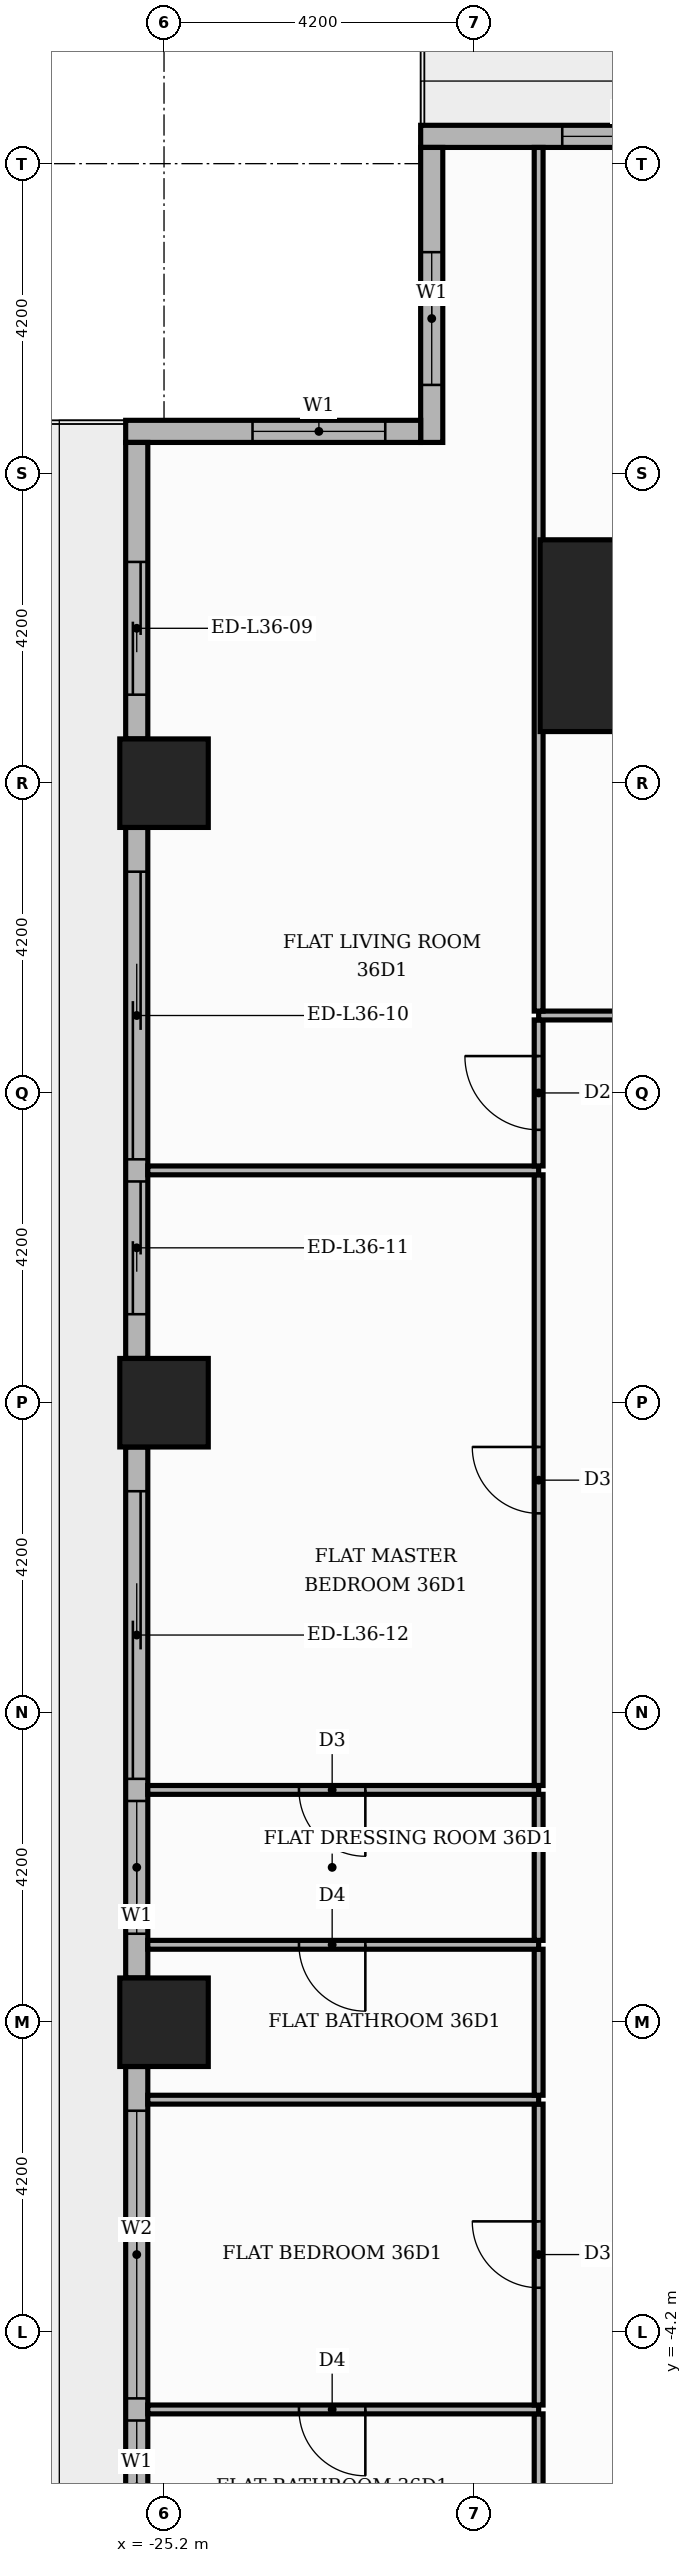
"""IFC4 building model, lengths in metres.
Left out: names, types, materials, properties, quantities, classifications, styles, units other than length and angle.
Written with IfcOpenShell. Run it as: python <this file> out.ifc"""

import sys

from ifc_helpers import new_model, si_unit, direction, frame, frame_2d, origin, origin_2d, place, context, subcontext, project, spatial, rectangle, extrude, element, fill, save


model = new_model("IFC4")
c1 = context("Model", 3, precision=1e-05, world=origin(), true_north=direction((0.0, 1.0)))
c2 = subcontext(c1, "Body", "Model", "MODEL_VIEW")
j1 = project(units=[si_unit("LENGTHUNIT", "METRE"), si_unit("PLANEANGLEUNIT", "RADIAN")], contexts=[c1])
p1 = place(None, origin())
s1 = spatial("IfcSite", under=j1, at=p1, CompositionType="ELEMENT")
p2 = place(p1, origin())
s2 = spatial("IfcBuilding", under=s1, at=p2, CompositionType="ELEMENT")
p3 = place(p2, frame((0.0, 0.0, 153.3)))
s3 = spatial("IfcBuildingStorey", under=s2, at=p3, CompositionType="ELEMENT", Elevation=153.3)
p4 = place(p3, frame((-18.8, 18.8, 0.0), z_axis=(0.0, 0.0, 1.0), x_axis=(1.0, 0.0, 0.0)))
e1 = element("IfcColumn", 1, at=p4, inside=s3, PredefinedType="COLUMN", context=c2, shape_type="SweptSolid", body=[
    extrude(rectangle(XDim=2.6, YDim=2.6, at=origin_2d()), origin(), (0.0, 0.0, 1.0), 3.9),
])
for number, where, z_axis, x_axis in (
    (2, (-25.2, 0.0, 0.0), (0.0, 0.0, 1.0), (1.0, 0.0, 0.0)),
    (3, (-25.2, 8.4, 0.0), (0.0, 0.0, 1.0), (1.0, 0.0, 0.0)),
    (4, (-25.2, 16.8, 0.0), (0.0, 0.0, 1.0), (1.0, 0.0, 0.0)),
):
    element("IfcColumn", number, at=place(p3, frame(where, z_axis=z_axis, x_axis=x_axis)), inside=s3, PredefinedType="COLUMN", context=c2, shape_type="SweptSolid", body=[
        extrude(rectangle(XDim=1.2, YDim=1.2, at=origin_2d()), origin(), (0.0, 0.0, 1.0), 3.9),
    ])
p5 = place(p3, frame((-17.4, 25.57, 0.0), z_axis=(0.0, 0.0, 1.0), x_axis=(-1.0, 0.0, 0.0)))
e5 = element("IfcWall", 5, at=p5, inside=s3, PredefinedType="STANDARD", context=c2, shape_type="SweptSolid", body=[
    extrude(rectangle(XDim=4.32, YDim=0.3, at=frame_2d((2.16, 0.0))), origin(), (0.0, 0.0, 1.0), 3.48),
])
p6 = place(p5, frame((0.6, 0.0, 0.9)))
e6 = element("IfcOpeningElement", 6, at=p6, cuts=e5, PredefinedType="OPENING", context=c2, shape_type="SweptSolid", body=[
    extrude(rectangle(XDim=1.8, YDim=2.1, at=frame_2d((0.9, 1.05))), frame((0.0, 0.16, 0.0), z_axis=(0.0, -1.0, 0.0), x_axis=(1.0, 0.0, 0.0)), (0.0, 0.0, 1.0), 0.32),
])
p7 = place(p3, frame((-21.57, 25.42, 0.0), z_axis=(0.0, 0.0, 1.0), x_axis=(0.0, -1.0, 0.0)))
e7 = element("IfcWall", 7, at=p7, inside=s3, PredefinedType="STANDARD", context=c2, shape_type="SweptSolid", body=[
    extrude(rectangle(XDim=4.0, YDim=0.3, at=frame_2d((2.0, 0.0))), origin(), (0.0, 0.0, 1.0), 3.48),
])
p8 = place(p7, frame((1.42, 0.0, 0.9)))
e8 = element("IfcOpeningElement", 8, at=p8, cuts=e7, PredefinedType="OPENING", context=c2, shape_type="SweptSolid", body=[
    extrude(rectangle(XDim=1.8, YDim=2.1, at=frame_2d((0.9, 1.05))), frame((0.0, 0.16, 0.0), z_axis=(0.0, -1.0, 0.0), x_axis=(1.0, 0.0, 0.0)), (0.0, 0.0, 1.0), 0.32),
])
p9 = place(p3, frame((-21.72, 21.57, 0.0), z_axis=(0.0, 0.0, 1.0), x_axis=(-1.0, 0.0, 0.0)))
e9 = element("IfcWall", 9, at=p9, inside=s3, PredefinedType="STANDARD", context=c2, shape_type="SweptSolid", body=[
    extrude(rectangle(XDim=4.0, YDim=0.3, at=frame_2d((2.0, 0.0))), origin(), (0.0, 0.0, 1.0), 3.48),
])
p10 = place(p9, frame((0.48, 0.0, 0.9)))
e10 = element("IfcOpeningElement", 10, at=p10, cuts=e9, PredefinedType="OPENING", context=c2, shape_type="SweptSolid", body=[
    extrude(rectangle(XDim=1.8, YDim=2.1, at=frame_2d((0.9, 1.05))), frame((0.0, 0.16, 0.0), z_axis=(0.0, -1.0, 0.0), x_axis=(1.0, 0.0, 0.0)), (0.0, 0.0, 1.0), 0.32),
])
p11 = place(p3, frame((-25.57, 21.42, 0.0), z_axis=(0.0, 0.0, 1.0), x_axis=(0.0, -1.0, 0.0)))
e11 = element("IfcWall", 11, at=p11, inside=s3, PredefinedType="STANDARD", context=c2, shape_type="SweptSolid", body=[
    extrude(rectangle(XDim=4.02, YDim=0.3, at=frame_2d((2.01, 0.0))), origin(), (0.0, 0.0, 1.0), 3.48),
])
p12 = place(p11, frame((1.62, 0.0, 0.0)))
e12 = element("IfcOpeningElement", 12, at=p12, cuts=e11, PredefinedType="OPENING", context=c2, shape_type="SweptSolid", body=[
    extrude(rectangle(XDim=1.8, YDim=2.4, at=frame_2d((0.9, 1.2))), frame((0.0, 0.16, 0.0), z_axis=(0.0, -1.0, 0.0), x_axis=(1.0, 0.0, 0.0)), (0.0, 0.0, 1.0), 0.32),
])
p13 = place(p3, frame((-25.57, 16.2, 0.0), z_axis=(0.0, 0.0, 1.0), x_axis=(0.0, -1.0, 0.0)))
e13 = element("IfcWall", 13, at=p13, inside=s3, PredefinedType="STANDARD", context=c2, shape_type="SweptSolid", body=[
    extrude(rectangle(XDim=7.2, YDim=0.3, at=frame_2d((3.6, 0.0))), origin(), (0.0, 0.0, 1.0), 3.48),
])
p14 = place(p13, frame((0.6, 0.0, 0.0)))
e14 = element("IfcOpeningElement", 14, at=p14, cuts=e13, PredefinedType="OPENING", context=c2, shape_type="SweptSolid", body=[
    extrude(rectangle(XDim=3.9, YDim=2.4, at=frame_2d((1.95, 1.2))), frame((0.0, 0.16, 0.0), z_axis=(0.0, -1.0, 0.0), x_axis=(1.0, 0.0, 0.0)), (0.0, 0.0, 1.0), 0.32),
])
p15 = place(p13, frame((4.8, 0.0, 0.0)))
e15 = element("IfcOpeningElement", 15, at=p15, cuts=e13, PredefinedType="OPENING", context=c2, shape_type="SweptSolid", body=[
    extrude(rectangle(XDim=1.8, YDim=2.4, at=frame_2d((0.9, 1.2))), frame((0.0, 0.16, 0.0), z_axis=(0.0, -1.0, 0.0), x_axis=(1.0, 0.0, 0.0)), (0.0, 0.0, 1.0), 0.32),
])
p16 = place(p3, frame((-25.57, 7.8, 0.0), z_axis=(0.0, 0.0, 1.0), x_axis=(0.0, -1.0, 0.0)))
e16 = element("IfcWall", 16, at=p16, inside=s3, PredefinedType="STANDARD", context=c2, shape_type="SweptSolid", body=[
    extrude(rectangle(XDim=7.2, YDim=0.3, at=frame_2d((3.6, 0.0))), origin(), (0.0, 0.0, 1.0), 3.48),
])
p17 = place(p16, frame((0.6, 0.0, 0.0)))
e17 = element("IfcOpeningElement", 17, at=p17, cuts=e16, PredefinedType="OPENING", context=c2, shape_type="SweptSolid", body=[
    extrude(rectangle(XDim=3.9, YDim=2.4, at=frame_2d((1.95, 1.2))), frame((0.0, 0.16, 0.0), z_axis=(0.0, -1.0, 0.0), x_axis=(1.0, 0.0, 0.0)), (0.0, 0.0, 1.0), 0.32),
])
p18 = place(p16, frame((4.8, 0.0, 0.9)))
e18 = element("IfcOpeningElement", 18, at=p18, cuts=e16, PredefinedType="OPENING", context=c2, shape_type="SweptSolid", body=[
    extrude(rectangle(XDim=1.8, YDim=2.1, at=frame_2d((0.9, 1.05))), frame((0.0, 0.16, 0.0), z_axis=(0.0, -1.0, 0.0), x_axis=(1.0, 0.0, 0.0)), (0.0, 0.0, 1.0), 0.32),
])
p19 = place(p3, frame((-25.57, -0.6, 0.0), z_axis=(0.0, 0.0, 1.0), x_axis=(0.0, -1.0, 0.0)))
e19 = element("IfcWall", 19, at=p19, inside=s3, PredefinedType="STANDARD", context=c2, shape_type="SweptSolid", body=[
    extrude(rectangle(XDim=7.2, YDim=0.3, at=frame_2d((3.6, 0.0))), origin(), (0.0, 0.0, 1.0), 3.48),
])
p20 = place(p19, frame((0.6, 0.0, 0.9)))
e20 = element("IfcOpeningElement", 20, at=p20, cuts=e19, PredefinedType="OPENING", context=c2, shape_type="SweptSolid", body=[
    extrude(rectangle(XDim=3.9, YDim=2.1, at=frame_2d((1.95, 1.05))), frame((0.0, 0.16, 0.0), z_axis=(0.0, -1.0, 0.0), x_axis=(1.0, 0.0, 0.0)), (0.0, 0.0, 1.0), 0.32),
])
p21 = place(p19, frame((4.8, 0.0, 0.9)))
e21 = element("IfcOpeningElement", 21, at=p21, cuts=e19, PredefinedType="OPENING", context=c2, shape_type="SweptSolid", body=[
    extrude(rectangle(XDim=1.8, YDim=2.1, at=frame_2d((0.9, 1.05))), frame((0.0, 0.16, 0.0), z_axis=(0.0, -1.0, 0.0), x_axis=(1.0, 0.0, 0.0)), (0.0, 0.0, 1.0), 0.32),
])
p22 = place(p3, frame((-20.12, -7.29, 0.0), z_axis=(0.0, 0.0, 1.0), x_axis=(0.0, 1.0, 0.0)))
e22 = element("IfcWall", 22, at=p22, inside=s3, PredefinedType="PARTITIONING", context=c2, shape_type="SweptSolid", body=[
    extrude(rectangle(XDim=1.98, YDim=0.12, at=frame_2d((0.99, 0.0))), origin(), (0.0, 0.0, 1.0), 3.48),
])
p23 = place(p3, frame((-25.42, -5.25, 0.0), z_axis=(0.0, 0.0, 1.0), x_axis=(1.0, 0.0, 0.0)))
e23 = element("IfcWall", 23, at=p23, inside=s3, PredefinedType="PARTITIONING", context=c2, shape_type="SweptSolid", body=[
    extrude(rectangle(XDim=5.3, YDim=0.12, at=frame_2d((2.65, 0.0))), origin(), (0.0, 0.0, 1.0), 3.48),
])
p24 = place(p23, frame((2.05, 0.0, 0.0)))
e24 = element("IfcOpeningElement", 24, at=p24, cuts=e23, PredefinedType="OPENING", context=c2, shape_type="SweptSolid", body=[
    extrude(rectangle(XDim=0.9, YDim=2.1, at=frame_2d((0.45, 1.05))), frame((0.0, 0.07, 0.0), z_axis=(0.0, -1.0, 0.0), x_axis=(1.0, 0.0, 0.0)), (0.0, 0.0, 1.0), 0.14),
])
p25 = place(p3, frame((-20.12, -5.19, 0.0), z_axis=(0.0, 0.0, 1.0), x_axis=(0.0, 1.0, 0.0)))
e25 = element("IfcWall", 25, at=p25, inside=s3, PredefinedType="PARTITIONING", context=c2, shape_type="SweptSolid", body=[
    extrude(rectangle(XDim=4.08, YDim=0.12, at=frame_2d((2.04, 0.0))), origin(), (0.0, 0.0, 1.0), 3.48),
])
p26 = place(p25, frame((1.59, 0.0, 0.0)))
e26 = element("IfcOpeningElement", 26, at=p26, cuts=e25, PredefinedType="OPENING", context=c2, shape_type="SweptSolid", body=[
    extrude(rectangle(XDim=0.9, YDim=2.1, at=frame_2d((0.45, 1.05))), frame((0.0, 0.07, 0.0), z_axis=(0.0, -1.0, 0.0), x_axis=(1.0, 0.0, 0.0)), (0.0, 0.0, 1.0), 0.14),
])
p27 = place(p3, frame((-25.42, -1.05, 0.0), z_axis=(0.0, 0.0, 1.0), x_axis=(1.0, 0.0, 0.0)))
e27 = element("IfcWall", 27, at=p27, inside=s3, PredefinedType="PARTITIONING", context=c2, shape_type="SweptSolid", body=[
    extrude(rectangle(XDim=5.3, YDim=0.12, at=frame_2d((2.65, 0.0))), origin(), (0.0, 0.0, 1.0), 3.48),
])
p28 = place(p3, frame((-20.12, -0.99, 0.0), z_axis=(0.0, 0.0, 1.0), x_axis=(0.0, 1.0, 0.0)))
e28 = element("IfcWall", 28, at=p28, inside=s3, PredefinedType="PARTITIONING", context=c2, shape_type="SweptSolid", body=[
    extrude(rectangle(XDim=1.98, YDim=0.12, at=frame_2d((0.99, 0.0))), origin(), (0.0, 0.0, 1.0), 3.48),
])
p29 = place(p3, frame((-25.42, 1.05, 0.0), z_axis=(0.0, 0.0, 1.0), x_axis=(1.0, 0.0, 0.0)))
e29 = element("IfcWall", 29, at=p29, inside=s3, PredefinedType="PARTITIONING", context=c2, shape_type="SweptSolid", body=[
    extrude(rectangle(XDim=5.3, YDim=0.12, at=frame_2d((2.65, 0.0))), origin(), (0.0, 0.0, 1.0), 3.48),
])
p30 = place(p29, frame((2.05, 0.0, 0.0)))
e30 = element("IfcOpeningElement", 30, at=p30, cuts=e29, PredefinedType="OPENING", context=c2, shape_type="SweptSolid", body=[
    extrude(rectangle(XDim=0.9, YDim=2.1, at=frame_2d((0.45, 1.05))), frame((0.0, 0.07, 0.0), z_axis=(0.0, -1.0, 0.0), x_axis=(1.0, 0.0, 0.0)), (0.0, 0.0, 1.0), 0.14),
])
p31 = place(p3, frame((-20.12, 1.11, 0.0), z_axis=(0.0, 0.0, 1.0), x_axis=(0.0, 1.0, 0.0)))
e31 = element("IfcWall", 31, at=p31, inside=s3, PredefinedType="PARTITIONING", context=c2, shape_type="SweptSolid", body=[
    extrude(rectangle(XDim=1.98, YDim=0.12, at=frame_2d((0.99, 0.0))), origin(), (0.0, 0.0, 1.0), 3.48),
])
p32 = place(p3, frame((-25.42, 3.15, 0.0), z_axis=(0.0, 0.0, 1.0), x_axis=(1.0, 0.0, 0.0)))
e32 = element("IfcWall", 32, at=p32, inside=s3, PredefinedType="PARTITIONING", context=c2, shape_type="SweptSolid", body=[
    extrude(rectangle(XDim=5.3, YDim=0.12, at=frame_2d((2.65, 0.0))), origin(), (0.0, 0.0, 1.0), 3.48),
])
p33 = place(p32, frame((2.05, 0.0, 0.0)))
e33 = element("IfcOpeningElement", 33, at=p33, cuts=e32, PredefinedType="OPENING", context=c2, shape_type="SweptSolid", body=[
    extrude(rectangle(XDim=0.9, YDim=2.1, at=frame_2d((0.45, 1.05))), frame((0.0, 0.07, 0.0), z_axis=(0.0, -1.0, 0.0), x_axis=(1.0, 0.0, 0.0)), (0.0, 0.0, 1.0), 0.14),
])
p34 = place(p3, frame((-20.12, 3.21, 0.0), z_axis=(0.0, 0.0, 1.0), x_axis=(0.0, 1.0, 0.0)))
e34 = element("IfcWall", 34, at=p34, inside=s3, PredefinedType="PARTITIONING", context=c2, shape_type="SweptSolid", body=[
    extrude(rectangle(XDim=8.28, YDim=0.12, at=frame_2d((4.14, 0.0))), origin(), (0.0, 0.0, 1.0), 3.48),
])
p35 = place(p34, frame((3.69, 0.0, 0.0)))
e35 = element("IfcOpeningElement", 35, at=p35, cuts=e34, PredefinedType="OPENING", context=c2, shape_type="SweptSolid", body=[
    extrude(rectangle(XDim=0.9, YDim=2.1, at=frame_2d((0.45, 1.05))), frame((0.0, 0.07, 0.0), z_axis=(0.0, -1.0, 0.0), x_axis=(1.0, 0.0, 0.0)), (0.0, 0.0, 1.0), 0.14),
])
p36 = place(p3, frame((-25.42, 11.55, 0.0), z_axis=(0.0, 0.0, 1.0), x_axis=(1.0, 0.0, 0.0)))
e36 = element("IfcWall", 36, at=p36, inside=s3, PredefinedType="PARTITIONING", context=c2, shape_type="SweptSolid", body=[
    extrude(rectangle(XDim=5.3, YDim=0.12, at=frame_2d((2.65, 0.0))), origin(), (0.0, 0.0, 1.0), 3.48),
])
p37 = place(p3, frame((-20.12, 11.61, 0.0), z_axis=(0.0, 0.0, 1.0), x_axis=(0.0, 1.0, 0.0)))
e37 = element("IfcWall", 37, at=p37, inside=s3, PredefinedType="PARTITIONING", context=c2, shape_type="SweptSolid", body=[
    extrude(rectangle(XDim=1.98, YDim=0.12, at=frame_2d((0.99, 0.0))), origin(), (0.0, 0.0, 1.0), 3.48),
])
p38 = place(p37, frame((0.49, 0.0, 0.0)))
e38 = element("IfcOpeningElement", 38, at=p38, cuts=e37, PredefinedType="OPENING", context=c2, shape_type="SweptSolid", body=[
    extrude(rectangle(XDim=1.0, YDim=2.1, at=frame_2d((0.5, 1.05))), frame((0.0, 0.07, 0.0), z_axis=(0.0, -1.0, 0.0), x_axis=(1.0, 0.0, 0.0)), (0.0, 0.0, 1.0), 0.14),
])
p39 = place(p3, frame((-20.12, 13.65, 0.0), z_axis=(0.0, 0.0, 1.0), x_axis=(1.0, 0.0, 0.0)))
e39 = element("IfcWall", 39, at=p39, inside=s3, PredefinedType="PARTITIONING", context=c2, shape_type="SweptSolid", body=[
    extrude(rectangle(XDim=6.47, YDim=0.12, at=frame_2d((3.235, 0.0))), origin(), (0.0, 0.0, 1.0), 3.48),
])
p40 = place(p39, frame((2.785, 0.0, 0.0)))
e40 = element("IfcOpeningElement", 40, at=p40, cuts=e39, PredefinedType="OPENING", context=c2, shape_type="SweptSolid", body=[
    extrude(rectangle(XDim=0.9, YDim=2.1, at=frame_2d((0.45, 1.05))), frame((0.0, 0.07, 0.0), z_axis=(0.0, -1.0, 0.0), x_axis=(1.0, 0.0, 0.0)), (0.0, 0.0, 1.0), 0.14),
])
p41 = place(p3, frame((-20.12, 13.71, 0.0), z_axis=(0.0, 0.0, 1.0), x_axis=(0.0, 1.0, 0.0)))
e41 = element("IfcWall", 41, at=p41, inside=s3, PredefinedType="PARTITIONING", context=c2, shape_type="SweptSolid", body=[
    extrude(rectangle(XDim=11.71, YDim=0.12, at=frame_2d((5.855, 0.0))), origin(), (0.0, 0.0, 1.0), 3.48),
])
p42 = place(p6, origin())
e42 = element("IfcWindow", 42, at=p42, inside=s3, PartitioningType="SINGLE_PANEL", PredefinedType="WINDOW", context=c2, shape_type="SweptSolid", body=[
    extrude(rectangle(XDim=1.8, YDim=2.1, at=frame_2d((0.9, 1.05))), frame((0.0, 0.03, 0.0), z_axis=(0.0, -1.0, 0.0), x_axis=(1.0, 0.0, 0.0)), (0.0, 0.0, 1.0), 0.06),
])
fill(e6, e42)
p43 = place(p8, origin())
e43 = element("IfcWindow", 43, at=p43, inside=s3, PartitioningType="SINGLE_PANEL", PredefinedType="WINDOW", context=c2, shape_type="SweptSolid", body=[
    extrude(rectangle(XDim=1.8, YDim=2.1, at=frame_2d((0.9, 1.05))), frame((0.0, 0.03, 0.0), z_axis=(0.0, -1.0, 0.0), x_axis=(1.0, 0.0, 0.0)), (0.0, 0.0, 1.0), 0.06),
])
fill(e8, e43)
p44 = place(p10, origin())
e44 = element("IfcWindow", 44, at=p44, inside=s3, PartitioningType="SINGLE_PANEL", PredefinedType="WINDOW", context=c2, shape_type="SweptSolid", body=[
    extrude(rectangle(XDim=1.8, YDim=2.1, at=frame_2d((0.9, 1.05))), frame((0.0, 0.03, 0.0), z_axis=(0.0, -1.0, 0.0), x_axis=(1.0, 0.0, 0.0)), (0.0, 0.0, 1.0), 0.06),
])
fill(e10, e44)
p45 = place(p12, origin())
e45 = element("IfcDoor", 45, at=p45, inside=s3, OperationType="SLIDING_TO_RIGHT", PredefinedType="DOOR", context=c2, shape_type="SweptSolid", body=[
    extrude(rectangle(XDim=1.8, YDim=2.4, at=frame_2d((0.9, 1.2))), frame((0.0, 0.025, 0.0), z_axis=(0.0, -1.0, 0.0), x_axis=(1.0, 0.0, 0.0)), (0.0, 0.0, 1.0), 0.05),
])
fill(e12, e45)
p46 = place(p14, origin())
e46 = element("IfcDoor", 46, at=p46, inside=s3, OperationType="SLIDING_TO_LEFT", PredefinedType="DOOR", context=c2, shape_type="SweptSolid", body=[
    extrude(rectangle(XDim=3.9, YDim=2.4, at=frame_2d((1.95, 1.2))), frame((0.0, 0.025, 0.0), z_axis=(0.0, -1.0, 0.0), x_axis=(1.0, 0.0, 0.0)), (0.0, 0.0, 1.0), 0.05),
])
fill(e14, e46)
p47 = place(p15, origin())
e47 = element("IfcDoor", 47, at=p47, inside=s3, OperationType="SLIDING_TO_RIGHT", PredefinedType="DOOR", context=c2, shape_type="SweptSolid", body=[
    extrude(rectangle(XDim=1.8, YDim=2.4, at=frame_2d((0.9, 1.2))), frame((0.0, 0.025, 0.0), z_axis=(0.0, -1.0, 0.0), x_axis=(1.0, 0.0, 0.0)), (0.0, 0.0, 1.0), 0.05),
])
fill(e15, e47)
p48 = place(p17, origin())
e48 = element("IfcDoor", 48, at=p48, inside=s3, OperationType="SLIDING_TO_LEFT", PredefinedType="DOOR", context=c2, shape_type="SweptSolid", body=[
    extrude(rectangle(XDim=3.9, YDim=2.4, at=frame_2d((1.95, 1.2))), frame((0.0, 0.025, 0.0), z_axis=(0.0, -1.0, 0.0), x_axis=(1.0, 0.0, 0.0)), (0.0, 0.0, 1.0), 0.05),
])
fill(e17, e48)
p49 = place(p18, origin())
e49 = element("IfcWindow", 49, at=p49, inside=s3, PartitioningType="SINGLE_PANEL", PredefinedType="WINDOW", context=c2, shape_type="SweptSolid", body=[
    extrude(rectangle(XDim=1.8, YDim=2.1, at=frame_2d((0.9, 1.05))), frame((0.0, 0.03, 0.0), z_axis=(0.0, -1.0, 0.0), x_axis=(1.0, 0.0, 0.0)), (0.0, 0.0, 1.0), 0.06),
])
fill(e18, e49)
p50 = place(p20, origin())
e50 = element("IfcWindow", 50, at=p50, inside=s3, PartitioningType="SINGLE_PANEL", PredefinedType="WINDOW", context=c2, shape_type="SweptSolid", body=[
    extrude(rectangle(XDim=3.9, YDim=2.1, at=frame_2d((1.95, 1.05))), frame((0.0, 0.03, 0.0), z_axis=(0.0, -1.0, 0.0), x_axis=(1.0, 0.0, 0.0)), (0.0, 0.0, 1.0), 0.06),
])
fill(e20, e50)
p51 = place(p21, origin())
e51 = element("IfcWindow", 51, at=p51, inside=s3, PartitioningType="SINGLE_PANEL", PredefinedType="WINDOW", context=c2, shape_type="SweptSolid", body=[
    extrude(rectangle(XDim=1.8, YDim=2.1, at=frame_2d((0.9, 1.05))), frame((0.0, 0.03, 0.0), z_axis=(0.0, -1.0, 0.0), x_axis=(1.0, 0.0, 0.0)), (0.0, 0.0, 1.0), 0.06),
])
fill(e21, e51)
p52 = place(p38, origin())
e52 = element("IfcDoor", 52, at=p52, inside=s3, OperationType="SINGLE_SWING_RIGHT", PredefinedType="DOOR", context=c2, shape_type="SweptSolid", body=[
    extrude(rectangle(XDim=1.0, YDim=2.1, at=frame_2d((0.5, 1.05))), frame((0.0, 0.025, 0.0), z_axis=(0.0, -1.0, 0.0), x_axis=(1.0, 0.0, 0.0)), (0.0, 0.0, 1.0), 0.05),
])
fill(e38, e52)
p53 = place(p35, origin())
e53 = element("IfcDoor", 53, at=p53, inside=s3, OperationType="SINGLE_SWING_RIGHT", PredefinedType="DOOR", context=c2, shape_type="SweptSolid", body=[
    extrude(rectangle(XDim=0.9, YDim=2.1, at=frame_2d((0.45, 1.05))), frame((0.0, 0.025, 0.0), z_axis=(0.0, -1.0, 0.0), x_axis=(1.0, 0.0, 0.0)), (0.0, 0.0, 1.0), 0.05),
])
fill(e35, e53)
p54 = place(p33, frame((0.9, 0.0, 0.0), z_axis=(0.0, 0.0, 1.0), x_axis=(-1.0, 0.0, 0.0)))
e54 = element("IfcDoor", 54, at=p54, inside=s3, OperationType="SINGLE_SWING_RIGHT", PredefinedType="DOOR", context=c2, shape_type="SweptSolid", body=[
    extrude(rectangle(XDim=0.9, YDim=2.1, at=frame_2d((0.45, 1.05))), frame((0.0, 0.025, 0.0), z_axis=(0.0, -1.0, 0.0), x_axis=(1.0, 0.0, 0.0)), (0.0, 0.0, 1.0), 0.05),
])
fill(e33, e54)
p55 = place(p30, frame((0.9, 0.0, 0.0), z_axis=(0.0, 0.0, 1.0), x_axis=(-1.0, 0.0, 0.0)))
e55 = element("IfcDoor", 55, at=p55, inside=s3, OperationType="SINGLE_SWING_RIGHT", PredefinedType="DOOR", context=c2, shape_type="SweptSolid", body=[
    extrude(rectangle(XDim=0.9, YDim=2.1, at=frame_2d((0.45, 1.05))), frame((0.0, 0.025, 0.0), z_axis=(0.0, -1.0, 0.0), x_axis=(1.0, 0.0, 0.0)), (0.0, 0.0, 1.0), 0.05),
])
fill(e30, e55)
p56 = place(p26, origin())
e56 = element("IfcDoor", 56, at=p56, inside=s3, OperationType="SINGLE_SWING_RIGHT", PredefinedType="DOOR", context=c2, shape_type="SweptSolid", body=[
    extrude(rectangle(XDim=0.9, YDim=2.1, at=frame_2d((0.45, 1.05))), frame((0.0, 0.025, 0.0), z_axis=(0.0, -1.0, 0.0), x_axis=(1.0, 0.0, 0.0)), (0.0, 0.0, 1.0), 0.05),
])
fill(e26, e56)
p57 = place(p24, frame((0.9, 0.0, 0.0), z_axis=(0.0, 0.0, 1.0), x_axis=(-1.0, 0.0, 0.0)))
e57 = element("IfcDoor", 57, at=p57, inside=s3, OperationType="SINGLE_SWING_RIGHT", PredefinedType="DOOR", context=c2, shape_type="SweptSolid", body=[
    extrude(rectangle(XDim=0.9, YDim=2.1, at=frame_2d((0.45, 1.05))), frame((0.0, 0.025, 0.0), z_axis=(0.0, -1.0, 0.0), x_axis=(1.0, 0.0, 0.0)), (0.0, 0.0, 1.0), 0.05),
])
fill(e24, e57)
save(model, sys.argv[1])
